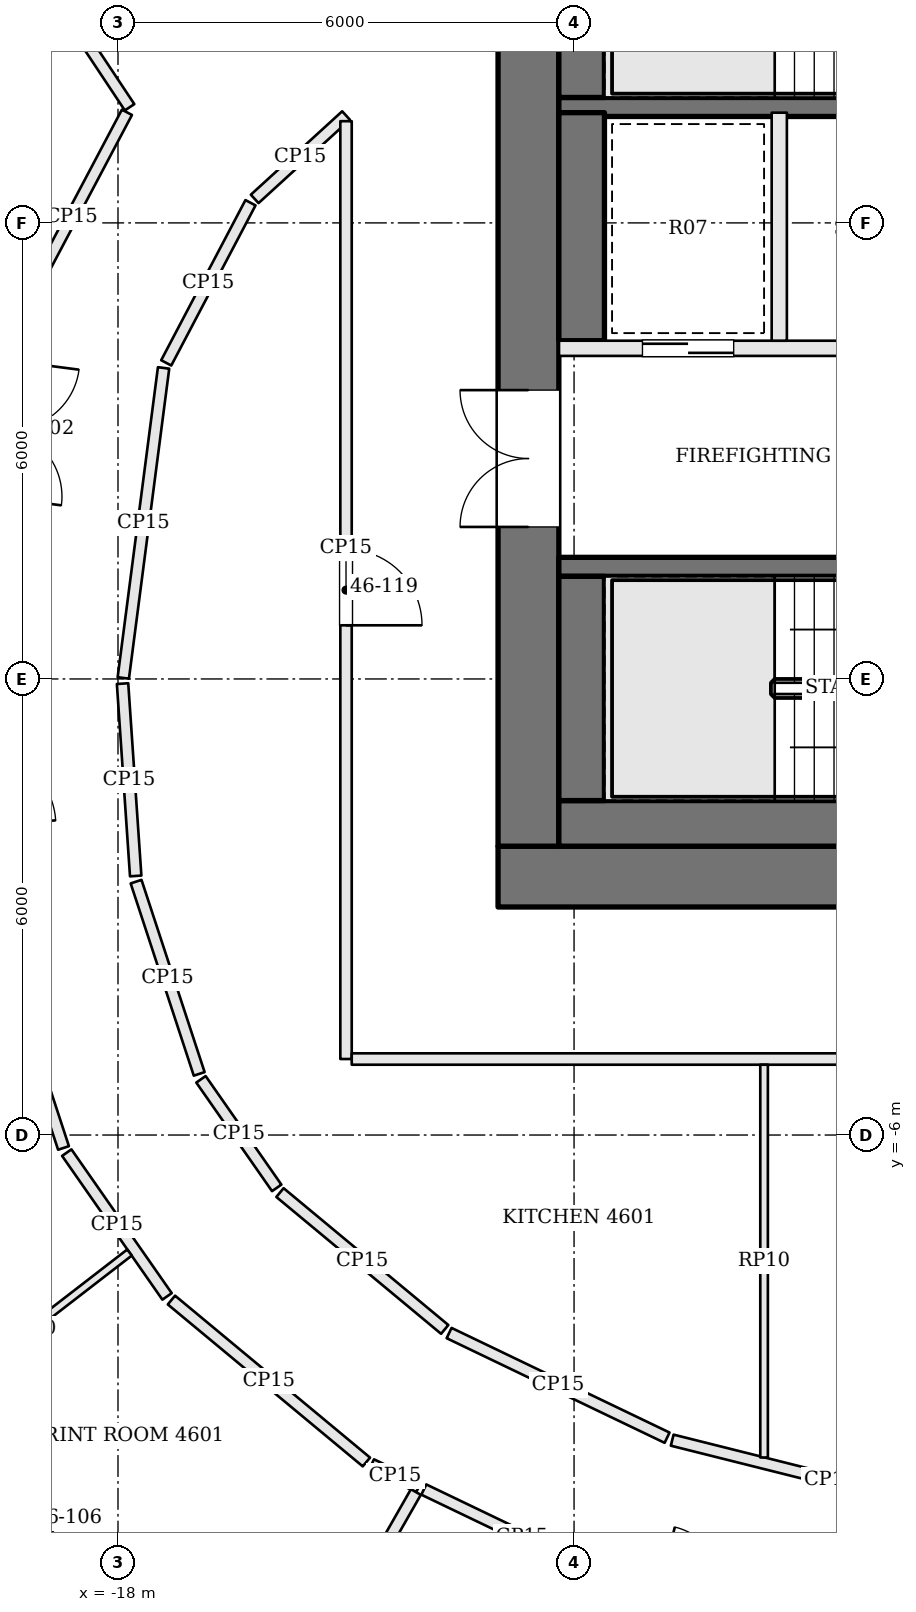
"""IFC4 building model, lengths in metres.
Left out: names, types, materials, properties, quantities, classifications, styles, units other than length and angle.
Written with IfcOpenShell. Run it as: python <this file> out.ifc"""

import sys

from ifc_helpers import new_model, si_unit, direction, frame, frame_2d, origin, place, context, subcontext, project, spatial, rectangle, extrude, element, fill, save


model = new_model("IFC4")
c1 = context("Model", 3, precision=1e-05, world=origin(), true_north=direction((0.0, 1.0)))
c2 = subcontext(c1, "Body", "Model", "MODEL_VIEW")
j1 = project(units=[si_unit("LENGTHUNIT", "METRE"), si_unit("PLANEANGLEUNIT", "RADIAN")], contexts=[c1])
p1 = place(None, origin())
s1 = spatial("IfcSite", under=j1, at=p1, CompositionType="ELEMENT")
p2 = place(p1, origin())
s2 = spatial("IfcBuilding", under=s1, at=p2, CompositionType="ELEMENT")
p3 = place(p2, frame((0.0, 0.0, 189.6)))
s3 = spatial("IfcBuildingStorey", under=s2, at=p3, CompositionType="ELEMENT", Elevation=189.6)
p4 = place(p3, frame((-13.0, -2.6, 0.0), z_axis=(0.0, 0.0, 1.0), x_axis=(1.0, 0.0, 0.0)))
e1 = element("IfcWall", 1, at=p4, inside=s3, PredefinedType="SHEAR", context=c2, shape_type="SweptSolid", body=[
    extrude(rectangle(XDim=26.0, YDim=0.8, at=frame_2d((13.0, 0.0))), origin(), (0.0, 0.0, 1.0), 3.9),
])
p5 = place(p4, frame((9.475, 0.0, 0.0)))
e2 = element("IfcOpeningElement", 2, at=p5, cuts=e1, PredefinedType="OPENING", context=c2, shape_type="SweptSolid", body=[
    extrude(rectangle(XDim=0.9, YDim=2.1, at=frame_2d((0.45, 1.05))), frame((0.0, 0.41, 0.0), z_axis=(0.0, -1.0, 0.0), x_axis=(1.0, 0.0, 0.0)), (0.0, 0.0, 1.0), 0.82),
])
p6 = place(p4, frame((12.75, 0.0, 0.0)))
e3 = element("IfcOpeningElement", 3, at=p6, cuts=e1, PredefinedType="OPENING", context=c2, shape_type="SweptSolid", body=[
    extrude(rectangle(XDim=0.9, YDim=2.1, at=frame_2d((0.45, 1.05))), frame((0.0, 0.41, 0.0), z_axis=(0.0, -1.0, 0.0), x_axis=(1.0, 0.0, 0.0)), (0.0, 0.0, 1.0), 0.82),
])
p7 = place(p4, frame((15.05, 0.0, 0.0)))
e4 = element("IfcOpeningElement", 4, at=p7, cuts=e1, PredefinedType="OPENING", context=c2, shape_type="SweptSolid", body=[
    extrude(rectangle(XDim=1.0, YDim=2.1, at=frame_2d((0.5, 1.05))), frame((0.0, 0.41, 0.0), z_axis=(0.0, -1.0, 0.0), x_axis=(1.0, 0.0, 0.0)), (0.0, 0.0, 1.0), 0.82),
])
p8 = place(p4, frame((16.825, 0.0, 0.0)))
e5 = element("IfcOpeningElement", 5, at=p8, cuts=e1, PredefinedType="OPENING", context=c2, shape_type="SweptSolid", body=[
    extrude(rectangle(XDim=0.7, YDim=2.1, at=frame_2d((0.35, 1.05))), frame((0.0, 0.41, 0.0), z_axis=(0.0, -1.0, 0.0), x_axis=(1.0, 0.0, 0.0)), (0.0, 0.0, 1.0), 0.82),
])
p9 = place(p3, frame((-12.6, -2.2, 0.0), z_axis=(0.0, 0.0, 1.0), x_axis=(0.0, 1.0, 0.0)))
e6 = element("IfcWall", 6, at=p9, inside=s3, PredefinedType="SHEAR", context=c2, shape_type="SweptSolid", body=[
    extrude(rectangle(XDim=13.4, YDim=0.8, at=frame_2d((6.7, 0.0))), origin(), (0.0, 0.0, 1.0), 3.9),
])
p10 = place(p9, frame((4.2, 0.0, 0.0)))
e7 = element("IfcOpeningElement", 7, at=p10, cuts=e6, PredefinedType="OPENING", context=c2, shape_type="SweptSolid", body=[
    extrude(rectangle(XDim=1.8, YDim=2.1, at=frame_2d((0.9, 1.05))), frame((0.0, 0.41, 0.0), z_axis=(0.0, -1.0, 0.0), x_axis=(1.0, 0.0, 0.0)), (0.0, 0.0, 1.0), 0.82),
])
p11 = place(p3, frame((-12.2, 1.475, 0.0), z_axis=(0.0, 0.0, 1.0), x_axis=(1.0, 0.0, 0.0)))
e8 = element("IfcWall", 8, at=p11, inside=s3, PredefinedType="SOLIDWALL", context=c2, shape_type="SweptSolid", body=[
    extrude(rectangle(XDim=7.1, YDim=0.25, at=frame_2d((3.55, 0.0))), origin(), (0.0, 0.0, 1.0), 3.7),
])
p12 = place(p11, frame((5.8, 0.0, 0.0)))
e9 = element("IfcOpeningElement", 9, at=p12, cuts=e8, PredefinedType="OPENING", context=c2, shape_type="SweptSolid", body=[
    extrude(rectangle(XDim=1.2, YDim=2.1, at=frame_2d((0.6, 1.05))), frame((0.0, 0.135, 0.0), z_axis=(0.0, -1.0, 0.0), x_axis=(1.0, 0.0, 0.0)), (0.0, 0.0, 1.0), 0.27),
])
p13 = place(p3, frame((-12.2, 4.35, 0.0), z_axis=(0.0, 0.0, 1.0), x_axis=(1.0, 0.0, 0.0)))
e10 = element("IfcWall", 10, at=p13, inside=s3, PredefinedType="SOLIDWALL", context=c2, shape_type="SweptSolid", body=[
    extrude(rectangle(XDim=7.1, YDim=0.2, at=frame_2d((3.55, 0.0))), origin(), (0.0, 0.0, 1.0), 3.7),
])
p14 = place(p13, frame((4.4, 0.0, 0.0)))
e11 = element("IfcOpeningElement", 11, at=p14, cuts=e10, PredefinedType="OPENING", context=c2, shape_type="SweptSolid", body=[
    extrude(rectangle(XDim=1.2, YDim=2.1, at=frame_2d((0.6, 1.05))), frame((0.0, 0.11, 0.0), z_axis=(0.0, -1.0, 0.0), x_axis=(1.0, 0.0, 0.0)), (0.0, 0.0, 1.0), 0.22),
])
p15 = place(p13, frame((1.1, 0.0, 0.0)))
e12 = element("IfcOpeningElement", 12, at=p15, cuts=e10, PredefinedType="OPENING", context=c2, shape_type="SweptSolid", body=[
    extrude(rectangle(XDim=1.2, YDim=2.1, at=frame_2d((0.6, 1.05))), frame((0.0, 0.11, 0.0), z_axis=(0.0, -1.0, 0.0), x_axis=(1.0, 0.0, 0.0)), (0.0, 0.0, 1.0), 0.22),
])
p16 = place(p3, frame((-12.2, 7.525, 0.0), z_axis=(0.0, 0.0, 1.0), x_axis=(1.0, 0.0, 0.0)))
e13 = element("IfcWall", 13, at=p16, inside=s3, PredefinedType="SOLIDWALL", context=c2, shape_type="SweptSolid", body=[
    extrude(rectangle(XDim=7.1, YDim=0.25, at=frame_2d((3.55, 0.0))), origin(), (0.0, 0.0, 1.0), 3.7),
])
p17 = place(p16, frame((5.8, 0.0, 0.0)))
e14 = element("IfcOpeningElement", 14, at=p17, cuts=e13, PredefinedType="OPENING", context=c2, shape_type="SweptSolid", body=[
    extrude(rectangle(XDim=1.2, YDim=2.1, at=frame_2d((0.6, 1.05))), frame((0.0, 0.135, 0.0), z_axis=(0.0, -1.0, 0.0), x_axis=(1.0, 0.0, 0.0)), (0.0, 0.0, 1.0), 0.27),
])
p18 = place(p3, frame((-9.3, 4.45, 0.0), z_axis=(0.0, 0.0, 1.0), x_axis=(0.0, 1.0, 0.0)))
e15 = element("IfcWall", 15, at=p18, inside=s3, PredefinedType="SOLIDWALL", context=c2, shape_type="SweptSolid", body=[
    extrude(rectangle(XDim=3.0, YDim=0.2, at=frame_2d((1.5, 0.0))), origin(), (0.0, 0.0, 1.0), 3.7),
])
p19 = place(p3, frame((-12.2, -1.9, 0.0), z_axis=(0.0, 0.0, 1.0), x_axis=(1.0, 0.0, 0.0)))
e16 = element("IfcWall", 16, at=p19, inside=s3, PredefinedType="SOLIDWALL", context=c2, shape_type="SweptSolid", body=[
    extrude(rectangle(XDim=7.1, YDim=0.6, at=frame_2d((3.55, 0.0))), origin(), (0.0, 0.0, 1.0), 3.7),
])
p20 = place(p3, frame((-11.9, -1.6, 0.0), z_axis=(0.0, 0.0, 1.0), x_axis=(0.0, 1.0, 0.0)))
e17 = element("IfcWall", 17, at=p20, inside=s3, PredefinedType="SOLIDWALL", context=c2, shape_type="SweptSolid", body=[
    extrude(rectangle(XDim=2.95, YDim=0.6, at=frame_2d((1.475, 0.0))), origin(), (0.0, 0.0, 1.0), 3.7),
])
p21 = place(p3, frame((-11.9, 4.45, 0.0), z_axis=(0.0, 0.0, 1.0), x_axis=(0.0, 1.0, 0.0)))
e18 = element("IfcWall", 18, at=p21, inside=s3, PredefinedType="SOLIDWALL", context=c2, shape_type="SweptSolid", body=[
    extrude(rectangle(XDim=3.0, YDim=0.6, at=frame_2d((1.5, 0.0))), origin(), (0.0, 0.0, 1.0), 3.7),
])
p22 = place(p3, frame((-11.9, 7.65, 0.0), z_axis=(0.0, 0.0, 1.0), x_axis=(0.0, 1.0, 0.0)))
e19 = element("IfcWall", 19, at=p22, inside=s3, PredefinedType="SOLIDWALL", context=c2, shape_type="SweptSolid", body=[
    extrude(rectangle(XDim=2.95, YDim=0.6, at=frame_2d((1.475, 0.0))), origin(), (0.0, 0.0, 1.0), 3.7),
])
p23 = place(p3, frame((-19.456, 9.943, 0.0), z_axis=(0.0, 0.0, 1.0), x_axis=(0.553343067853, -0.832953449635, 0.0)))
e20 = element("IfcWall", 20, at=p23, inside=s3, PredefinedType="PARTITIONING", context=c2, shape_type="SweptSolid", body=[
    extrude(rectangle(XDim=2.907, YDim=0.15, at=frame_2d((1.454, 0.0))), origin(), (0.0, 0.0, 1.0), 3.084),
])
p24 = place(p3, frame((-17.883, 7.455, 0.0), z_axis=(0.0, 0.0, 1.0), x_axis=(-0.467721822532, -0.883875724708, 0.0)))
e21 = element("IfcWall", 21, at=p24, inside=s3, PredefinedType="PARTITIONING", context=c2, shape_type="SweptSolid", body=[
    extrude(rectangle(XDim=3.11, YDim=0.15, at=frame_2d((1.555, 0.0))), origin(), (0.0, 0.0, 1.0), 3.084),
])
p25 = place(p3, frame((-19.717, -3.124, 0.0), z_axis=(0.0, 0.0, 1.0), x_axis=(0.31188427026, -0.950120098706, 0.0)))
e22 = element("IfcWall", 22, at=p25, inside=s3, PredefinedType="PARTITIONING", context=c2, shape_type="SweptSolid", body=[
    extrude(rectangle(XDim=3.206, YDim=0.15, at=frame_2d((1.603, 0.0))), origin(), (0.0, 0.0, 1.0), 3.084),
])
p26 = place(p3, frame((-18.674, -6.232, 0.0), z_axis=(0.0, 0.0, 1.0), x_axis=(0.572118665737, -0.820170855563, 0.0)))
e23 = element("IfcWall", 23, at=p26, inside=s3, PredefinedType="PARTITIONING", context=c2, shape_type="SweptSolid", body=[
    extrude(rectangle(XDim=2.306, YDim=0.15, at=frame_2d((1.153, 0.0))), origin(), (0.0, 0.0, 1.0), 3.084),
])
p27 = place(p3, frame((-17.297, -8.171, 0.0), z_axis=(0.0, 0.0, 1.0), x_axis=(0.769228575061, -0.638973707839, 0.0)))
e24 = element("IfcWall", 24, at=p27, inside=s3, PredefinedType="PARTITIONING", context=c2, shape_type="SweptSolid", body=[
    extrude(rectangle(XDim=3.334, YDim=0.15, at=frame_2d((1.667, 0.0))), origin(), (0.0, 0.0, 1.0), 3.084),
])
p28 = place(p3, frame((-14.664, -10.334, 0.0), z_axis=(0.0, 0.0, 1.0), x_axis=(0.901550749347, -0.432673371439, 0.0)))
e25 = element("IfcWall", 25, at=p28, inside=s3, PredefinedType="PARTITIONING", context=c2, shape_type="SweptSolid", body=[
    extrude(rectangle(XDim=0.688, YDim=0.15, at=frame_2d((0.344, 0.0))), origin(), (0.0, 0.0, 1.0), 3.084),
])
p29 = place(p3, frame((-17.854, -17.306, 0.0), z_axis=(0.0, 0.0, 1.0), x_axis=(0.495796877379, 0.868438516178, 0.0)))
e26 = element("IfcWall", 26, at=p29, inside=s3, PredefinedType="PARTITIONING", context=c2, shape_type="SweptSolid", body=[
    extrude(rectangle(XDim=7.61, YDim=0.15, at=frame_2d((3.805, 0.0))), origin(), (0.0, 0.0, 1.0), 3.184),
])
p30 = place(p3, frame((-13.977, -10.664, 0.0), z_axis=(0.0, 0.0, 1.0), x_axis=(0.901497811871, -0.432783658646, 0.0)))
e27 = element("IfcWall", 27, at=p30, inside=s3, PredefinedType="PARTITIONING", context=c2, shape_type="SweptSolid", body=[
    extrude(rectangle(XDim=2.867, YDim=0.15, at=frame_2d((1.434, 0.0))), origin(), (0.0, 0.0, 1.0), 3.084),
])
p31 = place(p3, frame((-6.553, -11.056, 0.0), z_axis=(0.0, 0.0, 1.0), x_axis=(-0.970004917182, 0.243085294995, 0.0)))
e28 = element("IfcWall", 28, at=p31, inside=s3, PredefinedType="PARTITIONING", context=c2, shape_type="SweptSolid", body=[
    extrude(rectangle(XDim=4.284, YDim=0.15, at=frame_2d((2.142, 0.0))), origin(), (0.0, 0.0, 1.0), 3.084),
])
p32 = place(p3, frame((-10.776, -9.982, 0.0), z_axis=(0.0, 0.0, 1.0), x_axis=(-0.901511079436, 0.432756020933, 0.0)))
e29 = element("IfcWall", 29, at=p32, inside=s3, PredefinedType="PARTITIONING", context=c2, shape_type="SweptSolid", body=[
    extrude(rectangle(XDim=3.181, YDim=0.15, at=frame_2d((1.59, 0.0))), origin(), (0.0, 0.0, 1.0), 3.084),
])
p33 = place(p3, frame((-13.702, -8.557, 0.0), z_axis=(0.0, 0.0, 1.0), x_axis=(-0.769221825067, 0.638981833733, 0.0)))
e30 = element("IfcWall", 30, at=p33, inside=s3, PredefinedType="PARTITIONING", context=c2, shape_type="SweptSolid", body=[
    extrude(rectangle(XDim=2.817, YDim=0.15, at=frame_2d((1.409, 0.0))), origin(), (0.0, 0.0, 1.0), 3.084),
])
p34 = place(p3, frame((-15.912, -6.696, 0.0), z_axis=(0.0, 0.0, 1.0), x_axis=(-0.572078533763, 0.820198848578, 0.0)))
e31 = element("IfcWall", 31, at=p34, inside=s3, PredefinedType="PARTITIONING", context=c2, shape_type="SweptSolid", body=[
    extrude(rectangle(XDim=1.742, YDim=0.15, at=frame_2d((0.871, 0.0))), origin(), (0.0, 0.0, 1.0), 3.084),
])
p35 = place(p3, frame((-16.932, -5.196, 0.0), z_axis=(0.0, 0.0, 1.0), x_axis=(-0.311904957484, 0.950113307715, 0.0)))
e32 = element("IfcWall", 32, at=p35, inside=s3, PredefinedType="PARTITIONING", context=c2, shape_type="SweptSolid", body=[
    extrude(rectangle(XDim=2.662, YDim=0.15, at=frame_2d((1.331, 0.0))), origin(), (0.0, 0.0, 1.0), 3.084),
])
p36 = place(p3, frame((-17.767, -2.592, 0.0), z_axis=(0.0, 0.0, 1.0), x_axis=(-0.068154548533, 0.997674775422, 0.0)))
e33 = element("IfcWall", 33, at=p36, inside=s3, PredefinedType="PARTITIONING", context=c2, shape_type="SweptSolid", body=[
    extrude(rectangle(XDim=2.536, YDim=0.15, at=frame_2d((1.268, 0.0))), origin(), (0.0, 0.0, 1.0), 3.084),
])
p37 = place(p3, frame((-17.93, 0.013, 0.0), z_axis=(0.0, 0.0, 1.0), x_axis=(0.128862113677, 0.991662521052, 0.0)))
e34 = element("IfcWall", 34, at=p37, inside=s3, PredefinedType="PARTITIONING", context=c2, shape_type="SweptSolid", body=[
    extrude(rectangle(XDim=4.113, YDim=0.15, at=frame_2d((2.057, 0.0))), origin(), (0.0, 0.0, 1.0), 3.084),
])
p38 = place(p3, frame((-17.365, 4.158, 0.0), z_axis=(0.0, 0.0, 1.0), x_axis=(0.465619619263, 0.884984954763, 0.0)))
e35 = element("IfcWall", 35, at=p38, inside=s3, PredefinedType="PARTITIONING", context=c2, shape_type="SweptSolid", body=[
    extrude(rectangle(XDim=2.38, YDim=0.15, at=frame_2d((1.19, 0.0))), origin(), (0.0, 0.0, 1.0), 3.084),
])
p39 = place(p3, frame((-16.202, 6.316, 0.0), z_axis=(0.0, 0.0, 1.0), x_axis=(0.738485493928, 0.674269364021, 0.0)))
e36 = element("IfcWall", 36, at=p39, inside=s3, PredefinedType="PARTITIONING", context=c2, shape_type="SweptSolid", body=[
    extrude(rectangle(XDim=1.627, YDim=0.15, at=frame_2d((0.813, 0.0))), origin(), (0.0, 0.0, 1.0), 3.084),
])
p40 = place(p3, frame((-15.0, 7.338, 0.0), z_axis=(0.0, 0.0, 1.0), x_axis=(0.0, -1.0, 0.0)))
e37 = element("IfcWall", 37, at=p40, inside=s3, PredefinedType="PARTITIONING", context=c2, shape_type="SweptSolid", body=[
    extrude(rectangle(XDim=12.338, YDim=0.15, at=frame_2d((6.169, 0.0))), origin(), (0.0, 0.0, 1.0), 3.084),
])
p41 = place(p40, frame((5.632, 0.0, 0.0)))
e38 = element("IfcOpeningElement", 38, at=p41, cuts=e37, PredefinedType="OPENING", context=c2, shape_type="SweptSolid", body=[
    extrude(rectangle(XDim=1.0, YDim=2.1, at=frame_2d((0.5, 1.05))), frame((0.0, 0.085, 0.0), z_axis=(0.0, -1.0, 0.0), x_axis=(1.0, 0.0, 0.0)), (0.0, 0.0, 1.0), 0.17),
])
p42 = place(p3, frame((-14.925, -5.0, 0.0), z_axis=(0.0, 0.0, 1.0), x_axis=(1.0, 0.0, 0.0)))
e39 = element("IfcWall", 39, at=p42, inside=s3, PredefinedType="PARTITIONING", context=c2, shape_type="SweptSolid", body=[
    extrude(rectangle(XDim=29.925, YDim=0.15, at=frame_2d((14.962, 0.0))), origin(), (0.0, 0.0, 1.0), 3.084),
])
p43 = place(p42, frame((14.025, 0.0, 0.0)))
e40 = element("IfcOpeningElement", 40, at=p43, cuts=e39, PredefinedType="OPENING", context=c2, shape_type="SweptSolid", body=[
    extrude(rectangle(XDim=1.8, YDim=2.1, at=frame_2d((0.9, 1.05))), frame((0.0, 0.085, 0.0), z_axis=(0.0, -1.0, 0.0), x_axis=(1.0, 0.0, 0.0)), (0.0, 0.0, 1.0), 0.17),
])
p44 = place(p3, frame((-16.62, -13.153, 0.0), z_axis=(0.0, 0.0, 1.0), x_axis=(-0.76922129881, 0.638982467253, 0.0)))
e41 = element("IfcWall", 41, at=p44, inside=s3, PredefinedType="PARTITIONING", context=c2, shape_type="SweptSolid", body=[
    extrude(rectangle(XDim=4.238, YDim=0.1, at=frame_2d((2.119, 0.0))), origin(), (0.0, 0.0, 1.0), 3.084),
])
p45 = place(p44, frame((2.85, 0.0, 0.0)))
e42 = element("IfcOpeningElement", 42, at=p45, cuts=e41, PredefinedType="OPENING", context=c2, shape_type="SweptSolid", body=[
    extrude(rectangle(XDim=0.9, YDim=2.1, at=frame_2d((0.45, 1.05))), frame((0.0, 0.06, 0.0), z_axis=(0.0, -1.0, 0.0), x_axis=(1.0, 0.0, 0.0)), (0.0, 0.0, 1.0), 0.12),
])
p46 = place(p3, frame((-17.848, -7.546, 0.0), z_axis=(0.0, 0.0, 1.0), x_axis=(-0.791468360906, -0.611210138728, 0.0)))
e43 = element("IfcWall", 43, at=p46, inside=s3, PredefinedType="PARTITIONING", context=c2, shape_type="SweptSolid", body=[
    extrude(rectangle(XDim=3.279, YDim=0.1, at=frame_2d((1.64, 0.0))), origin(), (0.0, 0.0, 1.0), 3.084),
])
p47 = place(p3, frame((-9.5, -10.242, 0.0), z_axis=(0.0, 0.0, 1.0), x_axis=(0.0, 1.0, 0.0)))
e44 = element("IfcWall", 44, at=p47, inside=s3, PredefinedType="PARTITIONING", context=c2, shape_type="SweptSolid", body=[
    extrude(rectangle(XDim=5.167, YDim=0.1, at=frame_2d((2.583, 0.0))), origin(), (0.0, 0.0, 1.0), 3.084),
])
p48 = place(p10, origin())
e45 = element("IfcDoor", 45, at=p48, inside=s3, OperationType="DOUBLE_DOOR_SINGLE_SWING", PredefinedType="DOOR", context=c2, shape_type="SweptSolid", body=[
    extrude(rectangle(XDim=1.8, YDim=2.1, at=frame_2d((0.9, 1.05))), frame((0.0, 0.025, 0.0), z_axis=(0.0, -1.0, 0.0), x_axis=(1.0, 0.0, 0.0)), (0.0, 0.0, 1.0), 0.05),
])
fill(e7, e45)
p49 = place(p15, origin())
e46 = element("IfcDoor", 46, at=p49, inside=s3, OperationType="SLIDING_TO_RIGHT", PredefinedType="DOOR", context=c2, shape_type="SweptSolid", body=[
    extrude(rectangle(XDim=1.2, YDim=2.1, at=frame_2d((0.6, 1.05))), frame((0.0, 0.025, 0.0), z_axis=(0.0, -1.0, 0.0), x_axis=(1.0, 0.0, 0.0)), (0.0, 0.0, 1.0), 0.05),
])
fill(e12, e46)
p50 = place(p45, origin())
e47 = element("IfcDoor", 47, at=p50, inside=s3, OperationType="SINGLE_SWING_RIGHT", PredefinedType="DOOR", context=c2, shape_type="SweptSolid", body=[
    extrude(rectangle(XDim=0.9, YDim=2.1, at=frame_2d((0.45, 1.05))), frame((0.0, 0.025, 0.0), z_axis=(0.0, -1.0, 0.0), x_axis=(1.0, 0.0, 0.0)), (0.0, 0.0, 1.0), 0.05),
])
fill(e42, e47)
p51 = place(p41, origin())
e48 = element("IfcDoor", 48, at=p51, inside=s3, OperationType="SINGLE_SWING_RIGHT", PredefinedType="DOOR", context=c2, shape_type="SweptSolid", body=[
    extrude(rectangle(XDim=1.0, YDim=2.1, at=frame_2d((0.5, 1.05))), frame((0.0, 0.025, 0.0), z_axis=(0.0, -1.0, 0.0), x_axis=(1.0, 0.0, 0.0)), (0.0, 0.0, 1.0), 0.05),
])
fill(e38, e48)
save(model, sys.argv[1])
